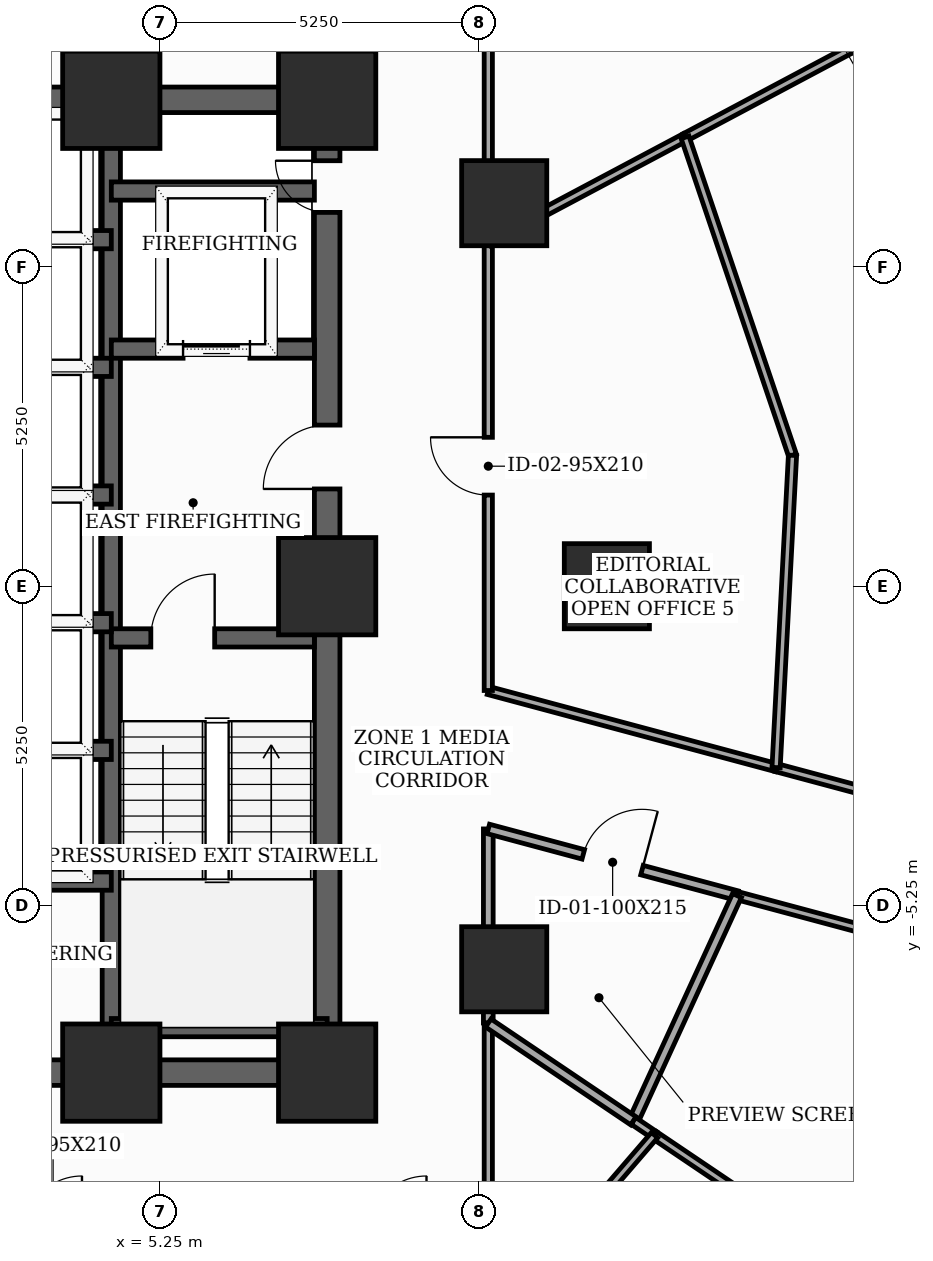
"""IFC4 building model, lengths in metres.
Left out: names, types, materials, properties, quantities, classifications, styles, units other than length and angle.
Written with IfcOpenShell. Run it as: python <this file> out.ifc"""

import sys

from ifc_helpers import new_model, si_unit, direction, frame, frame_2d, origin, origin_2d, place, context, subcontext, project, spatial, rectangle, extrude, element, fill, save


model = new_model("IFC4")
c1 = context("Model", 3, precision=1e-05, world=origin(), true_north=direction((0.0, 1.0)))
c2 = subcontext(c1, "Body", "Model", "MODEL_VIEW")
j1 = project(units=[si_unit("LENGTHUNIT", "METRE"), si_unit("PLANEANGLEUNIT", "RADIAN")], contexts=[c1])
p1 = place(None, origin())
s1 = spatial("IfcSite", under=j1, at=p1, CompositionType="ELEMENT")
p2 = place(p1, origin())
s2 = spatial("IfcBuilding", under=s1, at=p2, CompositionType="ELEMENT")
p3 = place(p2, frame((0.0, 0.0, 40.8)))
s3 = spatial("IfcBuildingStorey", under=s2, at=p3, CompositionType="ELEMENT", Elevation=40.8)
for number, where, z_axis, x_axis in (
    (1, (4.45, -8.0, 0.0), (0.0, 0.0, 1.0), (1.0, 0.0, 0.0)),
    (2, (8.0, -8.0, 0.0), (0.0, 0.0, 1.0), (1.0, 0.0, 0.0)),
    (3, (8.0, 0.0, 0.0), (0.0, 0.0, 1.0), (1.0, 0.0, 0.0)),
    (4, (8.0, 8.0, 0.0), (0.0, 0.0, 1.0), (1.0, 0.0, 0.0)),
    (5, (4.45, 8.0, 0.0), (0.0, 0.0, 1.0), (1.0, 0.0, 0.0)),
):
    element("IfcColumn", number, at=place(p3, frame(where, z_axis=z_axis, x_axis=x_axis)), inside=s3, PredefinedType="COLUMN", context=c2, shape_type="SweptSolid", body=[
        extrude(rectangle(XDim=1.6, YDim=1.6, at=origin_2d()), origin(), (0.0, 0.0, 1.0), 3.7),
    ])
for number, where, z_axis, x_axis in (
    (6, (12.6, 0.0, 0.0), (0.0, 0.0, 1.0), (1.0, 0.0, 0.0)),
    (7, (10.912, 6.3, 0.0), (0.0, 0.0, 1.0), (1.0, 0.0, 0.0)),
    (8, (10.912, -6.3, 0.0), (0.0, 0.0, 1.0), (1.0, 0.0, 0.0)),
):
    element("IfcColumn", number, at=place(p3, frame(where, z_axis=z_axis, x_axis=x_axis)), inside=s3, PredefinedType="COLUMN", context=c2, shape_type="SweptSolid", body=[
        extrude(rectangle(XDim=1.4, YDim=1.4, at=origin_2d()), origin(), (0.0, 0.0, 1.0), 3.7),
    ])
p4 = place(p3, frame((8.0, -8.0, 0.0), z_axis=(0.0, 0.0, 1.0), x_axis=(0.0, 1.0, 0.0)))
e9 = element("IfcWall", 9, at=p4, inside=s3, PredefinedType="SHEAR", context=c2, shape_type="SweptSolid", body=[
    extrude(rectangle(XDim=16.0, YDim=0.42, at=frame_2d((8.0, 0.0))), origin(), (0.0, 0.0, 1.0), 3.5),
])
p5 = place(p4, frame((9.6, 0.0, 0.0)))
e10 = element("IfcOpeningElement", 10, at=p5, cuts=e9, PredefinedType="OPENING", context=c2, shape_type="SweptSolid", body=[
    extrude(rectangle(XDim=1.05, YDim=2.15, at=frame_2d((0.525, 1.075))), frame((0.0, 0.22, 0.0), z_axis=(0.0, -1.0, 0.0), x_axis=(1.0, 0.0, 0.0)), (0.0, 0.0, 1.0), 0.44),
])
p6 = place(p4, frame((14.148, 0.0, 0.0)))
e11 = element("IfcOpeningElement", 11, at=p6, cuts=e9, PredefinedType="OPENING", context=c2, shape_type="SweptSolid", body=[
    extrude(rectangle(XDim=0.85, YDim=2.02, at=frame_2d((0.425, 1.01))), frame((0.0, 0.22, 0.0), z_axis=(0.0, -1.0, 0.0), x_axis=(1.0, 0.0, 0.0)), (0.0, 0.0, 1.0), 0.44),
])
p7 = place(p3, frame((-8.0, -8.0, 0.0), z_axis=(0.0, 0.0, 1.0), x_axis=(1.0, 0.0, 0.0)))
e12 = element("IfcWall", 12, at=p7, inside=s3, PredefinedType="SHEAR", context=c2, shape_type="SweptSolid", body=[
    extrude(rectangle(XDim=16.0, YDim=0.42, at=frame_2d((8.0, 0.0))), origin(), (0.0, 0.0, 1.0), 3.5),
])
p8 = place(p7, frame((4.6, 0.0, 0.0)))
e13 = element("IfcOpeningElement", 13, at=p8, cuts=e12, PredefinedType="OPENING", context=c2, shape_type="SweptSolid", body=[
    extrude(rectangle(XDim=0.95, YDim=2.1, at=frame_2d((0.475, 1.05))), frame((0.0, 0.22, 0.0), z_axis=(0.0, -1.0, 0.0), x_axis=(1.0, 0.0, 0.0)), (0.0, 0.0, 1.0), 0.44),
])
p9 = place(p7, frame((7.52, 0.0, 0.0)))
e14 = element("IfcOpeningElement", 14, at=p9, cuts=e12, PredefinedType="OPENING", context=c2, shape_type="SweptSolid", body=[
    extrude(rectangle(XDim=0.95, YDim=2.1, at=frame_2d((0.475, 1.05))), frame((0.0, 0.22, 0.0), z_axis=(0.0, -1.0, 0.0), x_axis=(1.0, 0.0, 0.0)), (0.0, 0.0, 1.0), 0.44),
])
p10 = place(p7, frame((10.45, 0.0, 0.0)))
e15 = element("IfcOpeningElement", 15, at=p10, cuts=e12, PredefinedType="OPENING", context=c2, shape_type="SweptSolid", body=[
    extrude(rectangle(XDim=0.95, YDim=2.1, at=frame_2d((0.475, 1.05))), frame((0.0, 0.22, 0.0), z_axis=(0.0, -1.0, 0.0), x_axis=(1.0, 0.0, 0.0)), (0.0, 0.0, 1.0), 0.44),
])
p11 = place(p3, frame((-8.0, 8.0, 0.0), z_axis=(0.0, 0.0, 1.0), x_axis=(1.0, 0.0, 0.0)))
e16 = element("IfcWall", 16, at=p11, inside=s3, PredefinedType="SHEAR", context=c2, shape_type="SweptSolid", body=[
    extrude(rectangle(XDim=16.0, YDim=0.42, at=frame_2d((8.0, 0.0))), origin(), (0.0, 0.0, 1.0), 3.5),
])
p12 = place(p11, frame((7.1, 0.0, 0.0)))
e17 = element("IfcOpeningElement", 17, at=p12, cuts=e16, PredefinedType="OPENING", context=c2, shape_type="SweptSolid", body=[
    extrude(rectangle(XDim=1.8, YDim=2.15, at=frame_2d((0.9, 1.075))), frame((0.0, 0.22, 0.0), z_axis=(0.0, -1.0, 0.0), x_axis=(1.0, 0.0, 0.0)), (0.0, 0.0, 1.0), 0.44),
])
p13 = place(p3, frame((4.45, -7.79, 0.0), z_axis=(0.0, 0.0, 1.0), x_axis=(0.0, 1.0, 0.0)))
e18 = element("IfcWall", 18, at=p13, inside=s3, PredefinedType="SHEAR", context=c2, shape_type="SweptSolid", body=[
    extrude(rectangle(XDim=15.58, YDim=0.3, at=frame_2d((7.79, 0.0))), origin(), (0.0, 0.0, 1.0), 3.5),
])
p14 = place(p3, frame((4.45, -0.85, 0.0), z_axis=(0.0, 0.0, 1.0), x_axis=(1.0, 0.0, 0.0)))
e19 = element("IfcWall", 19, at=p14, inside=s3, PredefinedType="SHEAR", context=c2, shape_type="SweptSolid", body=[
    extrude(rectangle(XDim=3.34, YDim=0.3, at=frame_2d((1.67, 0.0))), origin(), (0.0, 0.0, 1.0), 3.5),
])
p15 = place(p14, frame((0.65, 0.0, 0.0)))
e20 = element("IfcOpeningElement", 20, at=p15, cuts=e19, PredefinedType="OPENING", context=c2, shape_type="SweptSolid", body=[
    extrude(rectangle(XDim=1.05, YDim=2.15, at=frame_2d((0.525, 1.075))), frame((0.0, 0.16, 0.0), z_axis=(0.0, -1.0, 0.0), x_axis=(1.0, 0.0, 0.0)), (0.0, 0.0, 1.0), 0.32),
])
p16 = place(p3, frame((4.45, -7.26, 0.0), z_axis=(0.0, 0.0, 1.0), x_axis=(1.0, 0.0, 0.0)))
e21 = element("IfcWall", 21, at=p16, inside=s3, PredefinedType="SHEAR", context=c2, shape_type="SweptSolid", body=[
    extrude(rectangle(XDim=3.55, YDim=0.3, at=frame_2d((1.775, 0.0))), origin(), (0.0, 0.0, 1.0), 3.5),
])
p17 = place(p3, frame((4.45, 3.9, 0.0), z_axis=(0.0, 0.0, 1.0), x_axis=(1.0, 0.0, 0.0)))
e22 = element("IfcWall", 22, at=p17, inside=s3, PredefinedType="SHEAR", context=c2, shape_type="SweptSolid", body=[
    extrude(rectangle(XDim=3.34, YDim=0.3, at=frame_2d((1.67, 0.0))), origin(), (0.0, 0.0, 1.0), 3.5),
])
p18 = place(p17, frame((1.18, 0.0, 0.0)))
e23 = element("IfcOpeningElement", 23, at=p18, cuts=e22, PredefinedType="OPENING", context=c2, shape_type="SweptSolid", body=[
    extrude(rectangle(XDim=1.1, YDim=2.1, at=frame_2d((0.55, 1.05))), frame((0.0, 0.16, 0.0), z_axis=(0.0, -1.0, 0.0), x_axis=(1.0, 0.0, 0.0)), (0.0, 0.0, 1.0), 0.32),
])
p19 = place(p3, frame((4.45, 6.5, 0.0), z_axis=(0.0, 0.0, 1.0), x_axis=(1.0, 0.0, 0.0)))
e24 = element("IfcWall", 24, at=p19, inside=s3, PredefinedType="SHEAR", context=c2, shape_type="SweptSolid", body=[
    extrude(rectangle(XDim=3.34, YDim=0.3, at=frame_2d((1.67, 0.0))), origin(), (0.0, 0.0, 1.0), 3.5),
])
p20 = place(p3, frame((-4.45, -4.85, 0.0), z_axis=(0.0, 0.0, 1.0), x_axis=(1.0, 0.0, 0.0)))
e25 = element("IfcWall", 25, at=p20, inside=s3, PredefinedType="SHEAR", context=c2, shape_type="SweptSolid", body=[
    extrude(rectangle(XDim=8.9, YDim=0.3, at=frame_2d((4.45, 0.0))), origin(), (0.0, 0.0, 1.0), 3.5),
])
for number, where, z_axis, x_axis in (
    (26, (1.68, 1.5, 0.0), (0.0, 0.0, 1.0), (1.0, 0.0, 0.0)),
    (27, (1.68, 3.6, 0.0), (0.0, 0.0, 1.0), (1.0, 0.0, 0.0)),
    (28, (1.68, 5.7, 0.0), (0.0, 0.0, 1.0), (1.0, 0.0, 0.0)),
    (29, (1.68, -2.7, 0.0), (0.0, 0.0, 1.0), (1.0, 0.0, 0.0)),
    (30, (1.68, -0.6, 0.0), (0.0, 0.0, 1.0), (1.0, 0.0, 0.0)),
):
    element("IfcWall", number, at=place(p3, frame(where, z_axis=z_axis, x_axis=x_axis)), inside=s3, PredefinedType="SHEAR", context=c2, shape_type="SweptSolid", body=[
        extrude(rectangle(XDim=2.77, YDim=0.3, at=frame_2d((1.385, 0.0))), origin(), (0.0, 0.0, 1.0), 3.5),
    ])
p21 = place(p3, frame((10.65, 5.663, 0.0), z_axis=(0.0, 0.0, 1.0), x_axis=(0.0, 1.0, 0.0)))
e31 = element("IfcWall", 31, at=p21, inside=s3, PredefinedType="PARTITIONING", context=c2, shape_type="SweptSolid", body=[
    extrude(rectangle(XDim=4.487, YDim=0.135, at=frame_2d((2.243, 0.0))), origin(), (0.0, 0.0, 1.0), 2.785),
])
p22 = place(p3, frame((10.65, -7.184, 0.0), z_axis=(0.0, 0.0, 1.0), x_axis=(0.0, 1.0, 0.0)))
e32 = element("IfcWall", 32, at=p22, inside=s3, PredefinedType="PARTITIONING", context=c2, shape_type="SweptSolid", body=[
    extrude(rectangle(XDim=3.192, YDim=0.16, at=frame_2d((1.596, 0.0))), origin(), (0.0, 0.0, 1.0), 2.785),
])
p23 = place(p3, frame((10.65, -3.992, 0.0), z_axis=(0.0, 0.0, 1.0), x_axis=(0.965925146235, -0.258821583086, 0.0)))
e33 = element("IfcWall", 33, at=p23, inside=s3, PredefinedType="PARTITIONING", context=c2, shape_type="SweptSolid", body=[
    extrude(rectangle(XDim=4.234, YDim=0.16, at=frame_2d((2.117, 0.0))), origin(), (0.0, 0.0, 1.0), 2.785),
])
p24 = place(p23, frame((1.617, 0.0, 0.0)))
e34 = element("IfcOpeningElement", 34, at=p24, cuts=e33, PredefinedType="OPENING", context=c2, shape_type="SweptSolid", body=[
    extrude(rectangle(XDim=1.0, YDim=2.15, at=frame_2d((0.5, 1.075))), frame((0.0, 0.09, 0.0), z_axis=(0.0, -1.0, 0.0), x_axis=(1.0, 0.0, 0.0)), (0.0, 0.0, 1.0), 0.18),
])
p25 = place(p3, frame((14.74, -5.088, 0.0), z_axis=(0.0, 0.0, 1.0), x_axis=(0.965895912523, -0.258930659002, 0.0)))
e35 = element("IfcWall", 35, at=p25, inside=s3, PredefinedType="PARTITIONING", context=c2, shape_type="SweptSolid", body=[
    extrude(rectangle(XDim=7.045, YDim=0.135, at=frame_2d((3.522, 0.0))), origin(), (0.0, 0.0, 1.0), 2.935),
])
p26 = place(p25, frame((3.048, 0.0, 0.0)))
e36 = element("IfcOpeningElement", 36, at=p26, cuts=e35, PredefinedType="OPENING", context=c2, shape_type="SweptSolid", body=[
    extrude(rectangle(XDim=0.95, YDim=2.1, at=frame_2d((0.475, 1.05))), frame((0.0, 0.077, 0.0), z_axis=(0.0, -1.0, 0.0), x_axis=(1.0, 0.0, 0.0)), (0.0, 0.0, 1.0), 0.155),
])
p27 = place(p3, frame((22.115, -4.787, 0.0), z_axis=(0.0, 0.0, 1.0), x_axis=(-0.965912084765, 0.258870323726, 0.0)))
e37 = element("IfcWall", 37, at=p27, inside=s3, PredefinedType="PARTITIONING", context=c2, shape_type="SweptSolid", body=[
    extrude(rectangle(XDim=6.969, YDim=0.135, at=frame_2d((3.485, 0.0))), origin(), (0.0, 0.0, 1.0), 3.085),
])
p28 = place(p3, frame((15.383, -2.983, 0.0), z_axis=(0.0, 0.0, 1.0), x_axis=(-0.965947384406, 0.258738575706, 0.0)))
e38 = element("IfcWall", 38, at=p28, inside=s3, PredefinedType="PARTITIONING", context=c2, shape_type="SweptSolid", body=[
    extrude(rectangle(XDim=4.9, YDim=0.135, at=frame_2d((2.45, 0.0))), origin(), (0.0, 0.0, 1.0), 2.785),
])
p29 = place(p3, frame((10.65, -1.715, 0.0), z_axis=(0.0, 0.0, 1.0), x_axis=(0.0, 1.0, 0.0)))
e39 = element("IfcWall", 39, at=p29, inside=s3, PredefinedType="PARTITIONING", context=c2, shape_type="SweptSolid", body=[
    extrude(rectangle(XDim=7.378, YDim=0.135, at=frame_2d((3.689, 0.0))), origin(), (0.0, 0.0, 1.0), 2.785),
])
p30 = place(p29, frame((3.214, 0.0, 0.0)))
e40 = element("IfcOpeningElement", 40, at=p30, cuts=e39, PredefinedType="OPENING", context=c2, shape_type="SweptSolid", body=[
    extrude(rectangle(XDim=0.95, YDim=2.1, at=frame_2d((0.475, 1.05))), frame((0.0, 0.077, 0.0), z_axis=(0.0, -1.0, 0.0), x_axis=(1.0, 0.0, 0.0)), (0.0, 0.0, 1.0), 0.155),
])
p31 = place(p3, frame((10.65, -10.15, 0.0), z_axis=(0.0, 0.0, 1.0), x_axis=(0.0, 1.0, 0.0)))
e41 = element("IfcWall", 41, at=p31, inside=s3, PredefinedType="PARTITIONING", context=c2, shape_type="SweptSolid", body=[
    extrude(rectangle(XDim=2.966, YDim=0.135, at=frame_2d((1.483, 0.0))), origin(), (0.0, 0.0, 1.0), 3.5),
])
p32 = place(p3, frame((13.886, 7.383, 0.0), z_axis=(0.0, 0.0, 1.0), x_axis=(0.88293033741, 0.469504014126, 0.0)))
e42 = element("IfcWall", 42, at=p32, inside=s3, PredefinedType="PARTITIONING", context=c2, shape_type="SweptSolid", body=[
    extrude(rectangle(XDim=3.122, YDim=0.135, at=frame_2d((1.561, 0.0))), origin(), (0.0, 0.0, 1.0), 2.935),
])
p33 = place(p3, frame((10.65, 5.663, 0.0), z_axis=(0.0, 0.0, 1.0), x_axis=(0.88302513666, 0.469325695041, 0.0)))
e43 = element("IfcWall", 43, at=p33, inside=s3, PredefinedType="PARTITIONING", context=c2, shape_type="SweptSolid", body=[
    extrude(rectangle(XDim=3.665, YDim=0.135, at=frame_2d((1.833, 0.0))), origin(), (0.0, 0.0, 1.0), 2.785),
])
p34 = place(p3, frame((13.038, -8.794, 0.0), z_axis=(0.0, 0.0, 1.0), x_axis=(0.417322480709, 0.908758464662, 0.0)))
e44 = element("IfcWall", 44, at=p34, inside=s3, PredefinedType="PARTITIONING", context=c2, shape_type="SweptSolid", body=[
    extrude(rectangle(XDim=4.078, YDim=0.16, at=frame_2d((2.039, 0.0))), origin(), (0.0, 0.0, 1.0), 3.5),
])
p35 = place(p3, frame((10.65, -7.184, 0.0), z_axis=(0.0, 0.0, 1.0), x_axis=(0.829196392101, -0.558957371654, 0.0)))
e45 = element("IfcWall", 45, at=p35, inside=s3, PredefinedType="PARTITIONING", context=c2, shape_type="SweptSolid", body=[
    extrude(rectangle(XDim=2.88, YDim=0.16, at=frame_2d((1.44, 0.0))), origin(), (0.0, 0.0, 1.0), 3.5),
])
p36 = place(p3, frame((13.886, 7.383, 0.0), z_axis=(0.0, 0.0, 1.0), x_axis=(0.320099223205, -0.947384023141, 0.0)))
e46 = element("IfcWall", 46, at=p36, inside=s3, PredefinedType="PARTITIONING", context=c2, shape_type="SweptSolid", body=[
    extrude(rectangle(XDim=5.521, YDim=0.135, at=frame_2d((2.76, 0.0))), origin(), (0.0, 0.0, 1.0), 2.685),
])
p37 = place(p3, frame((15.653, 2.153, 0.0), z_axis=(0.0, 0.0, 1.0), x_axis=(-0.05250152841, -0.998620843721, 0.0)))
e47 = element("IfcWall", 47, at=p37, inside=s3, PredefinedType="PARTITIONING", context=c2, shape_type="SweptSolid", body=[
    extrude(rectangle(XDim=5.143, YDim=0.135, at=frame_2d((2.572, 0.0))), origin(), (0.0, 0.0, 1.0), 2.685),
])
p38 = place(p3, frame((13.038, -8.794, 0.0), z_axis=(0.0, 0.0, 1.0), x_axis=(0.828163729679, -0.560486250361, 0.0)))
e48 = element("IfcWall", 48, at=p38, inside=s3, PredefinedType="PARTITIONING", context=c2, shape_type="SweptSolid", body=[
    extrude(rectangle(XDim=0.418, YDim=0.135, at=frame_2d((0.209, 0.0))), origin(), (0.0, 0.0, 1.0), 3.5),
])
p39 = place(p3, frame((13.384, -9.028, 0.0), z_axis=(0.0, 0.0, 1.0), x_axis=(0.829042972493, -0.55918489765, 0.0)))
e49 = element("IfcWall", 49, at=p39, inside=s3, PredefinedType="PARTITIONING", context=c2, shape_type="SweptSolid", body=[
    extrude(rectangle(XDim=16.791, YDim=0.135, at=frame_2d((8.396, 0.0))), origin(), (0.0, 0.0, 1.0), 2.935),
])
p40 = place(p39, frame((7.936, 0.0, 0.0)))
e50 = element("IfcOpeningElement", 50, at=p40, cuts=e49, PredefinedType="OPENING", context=c2, shape_type="SweptSolid", body=[
    extrude(rectangle(XDim=0.92, YDim=2.1, at=frame_2d((0.46, 1.05))), frame((0.0, 0.077, 0.0), z_axis=(0.0, -1.0, 0.0), x_axis=(1.0, 0.0, 0.0)), (0.0, 0.0, 1.0), 0.155),
])
p41 = place(p3, frame((10.628, -12.226, 0.0), z_axis=(0.0, 0.0, 1.0), x_axis=(0.652832083446, 0.757502654004, 0.0)))
e51 = element("IfcWall", 51, at=p41, inside=s3, PredefinedType="PARTITIONING", context=c2, shape_type="SweptSolid", body=[
    extrude(rectangle(XDim=4.222, YDim=0.135, at=frame_2d((2.111, 0.0))), origin(), (0.0, 0.0, 1.0), 3.5),
])
p42 = place(p5, origin())
e52 = element("IfcDoor", 52, at=p42, inside=s3, OperationType="SINGLE_SWING_LEFT", PredefinedType="DOOR", context=c2, shape_type="SweptSolid", body=[
    extrude(rectangle(XDim=1.05, YDim=2.15, at=frame_2d((0.525, 1.075))), frame((0.0, 0.025, 0.0), z_axis=(0.0, -1.0, 0.0), x_axis=(1.0, 0.0, 0.0)), (0.0, 0.0, 1.0), 0.05),
])
fill(e10, e52)
p43 = place(p6, origin())
e53 = element("IfcDoor", 53, at=p43, inside=s3, OperationType="SINGLE_SWING_RIGHT", PredefinedType="TRAPDOOR", context=c2, shape_type="SweptSolid", body=[
    extrude(rectangle(XDim=0.85, YDim=2.02, at=frame_2d((0.425, 1.01))), frame((0.0, 0.025, 0.0), z_axis=(0.0, -1.0, 0.0), x_axis=(1.0, 0.0, 0.0)), (0.0, 0.0, 1.0), 0.05),
])
fill(e11, e53)
p44 = place(p15, origin())
e54 = element("IfcDoor", 54, at=p44, inside=s3, OperationType="SINGLE_SWING_RIGHT", PredefinedType="DOOR", context=c2, shape_type="SweptSolid", body=[
    extrude(rectangle(XDim=1.05, YDim=2.15, at=frame_2d((0.525, 1.075))), frame((0.0, 0.025, 0.0), z_axis=(0.0, -1.0, 0.0), x_axis=(1.0, 0.0, 0.0)), (0.0, 0.0, 1.0), 0.05),
])
fill(e20, e54)
p45 = place(p18, origin())
e55 = element("IfcDoor", 55, at=p45, inside=s3, OperationType="SLIDING_TO_LEFT", PredefinedType="DOOR", context=c2, shape_type="SweptSolid", body=[
    extrude(rectangle(XDim=1.1, YDim=2.1, at=frame_2d((0.55, 1.05))), frame((0.0, 0.025, 0.0), z_axis=(0.0, -1.0, 0.0), x_axis=(1.0, 0.0, 0.0)), (0.0, 0.0, 1.0), 0.05),
])
fill(e23, e55)
p46 = place(p24, origin())
e56 = element("IfcDoor", 56, at=p46, inside=s3, OperationType="SINGLE_SWING_RIGHT", PredefinedType="DOOR", context=c2, shape_type="SweptSolid", body=[
    extrude(rectangle(XDim=1.0, YDim=2.15, at=frame_2d((0.5, 1.075))), frame((0.0, 0.025, 0.0), z_axis=(0.0, -1.0, 0.0), x_axis=(1.0, 0.0, 0.0)), (0.0, 0.0, 1.0), 0.05),
])
fill(e34, e56)
p47 = place(p30, origin())
e57 = element("IfcDoor", 57, at=p47, inside=s3, OperationType="SINGLE_SWING_RIGHT", PredefinedType="DOOR", context=c2, shape_type="SweptSolid", body=[
    extrude(rectangle(XDim=0.95, YDim=2.1, at=frame_2d((0.475, 1.05))), frame((0.0, 0.025, 0.0), z_axis=(0.0, -1.0, 0.0), x_axis=(1.0, 0.0, 0.0)), (0.0, 0.0, 1.0), 0.05),
])
fill(e40, e57)
save(model, sys.argv[1])
